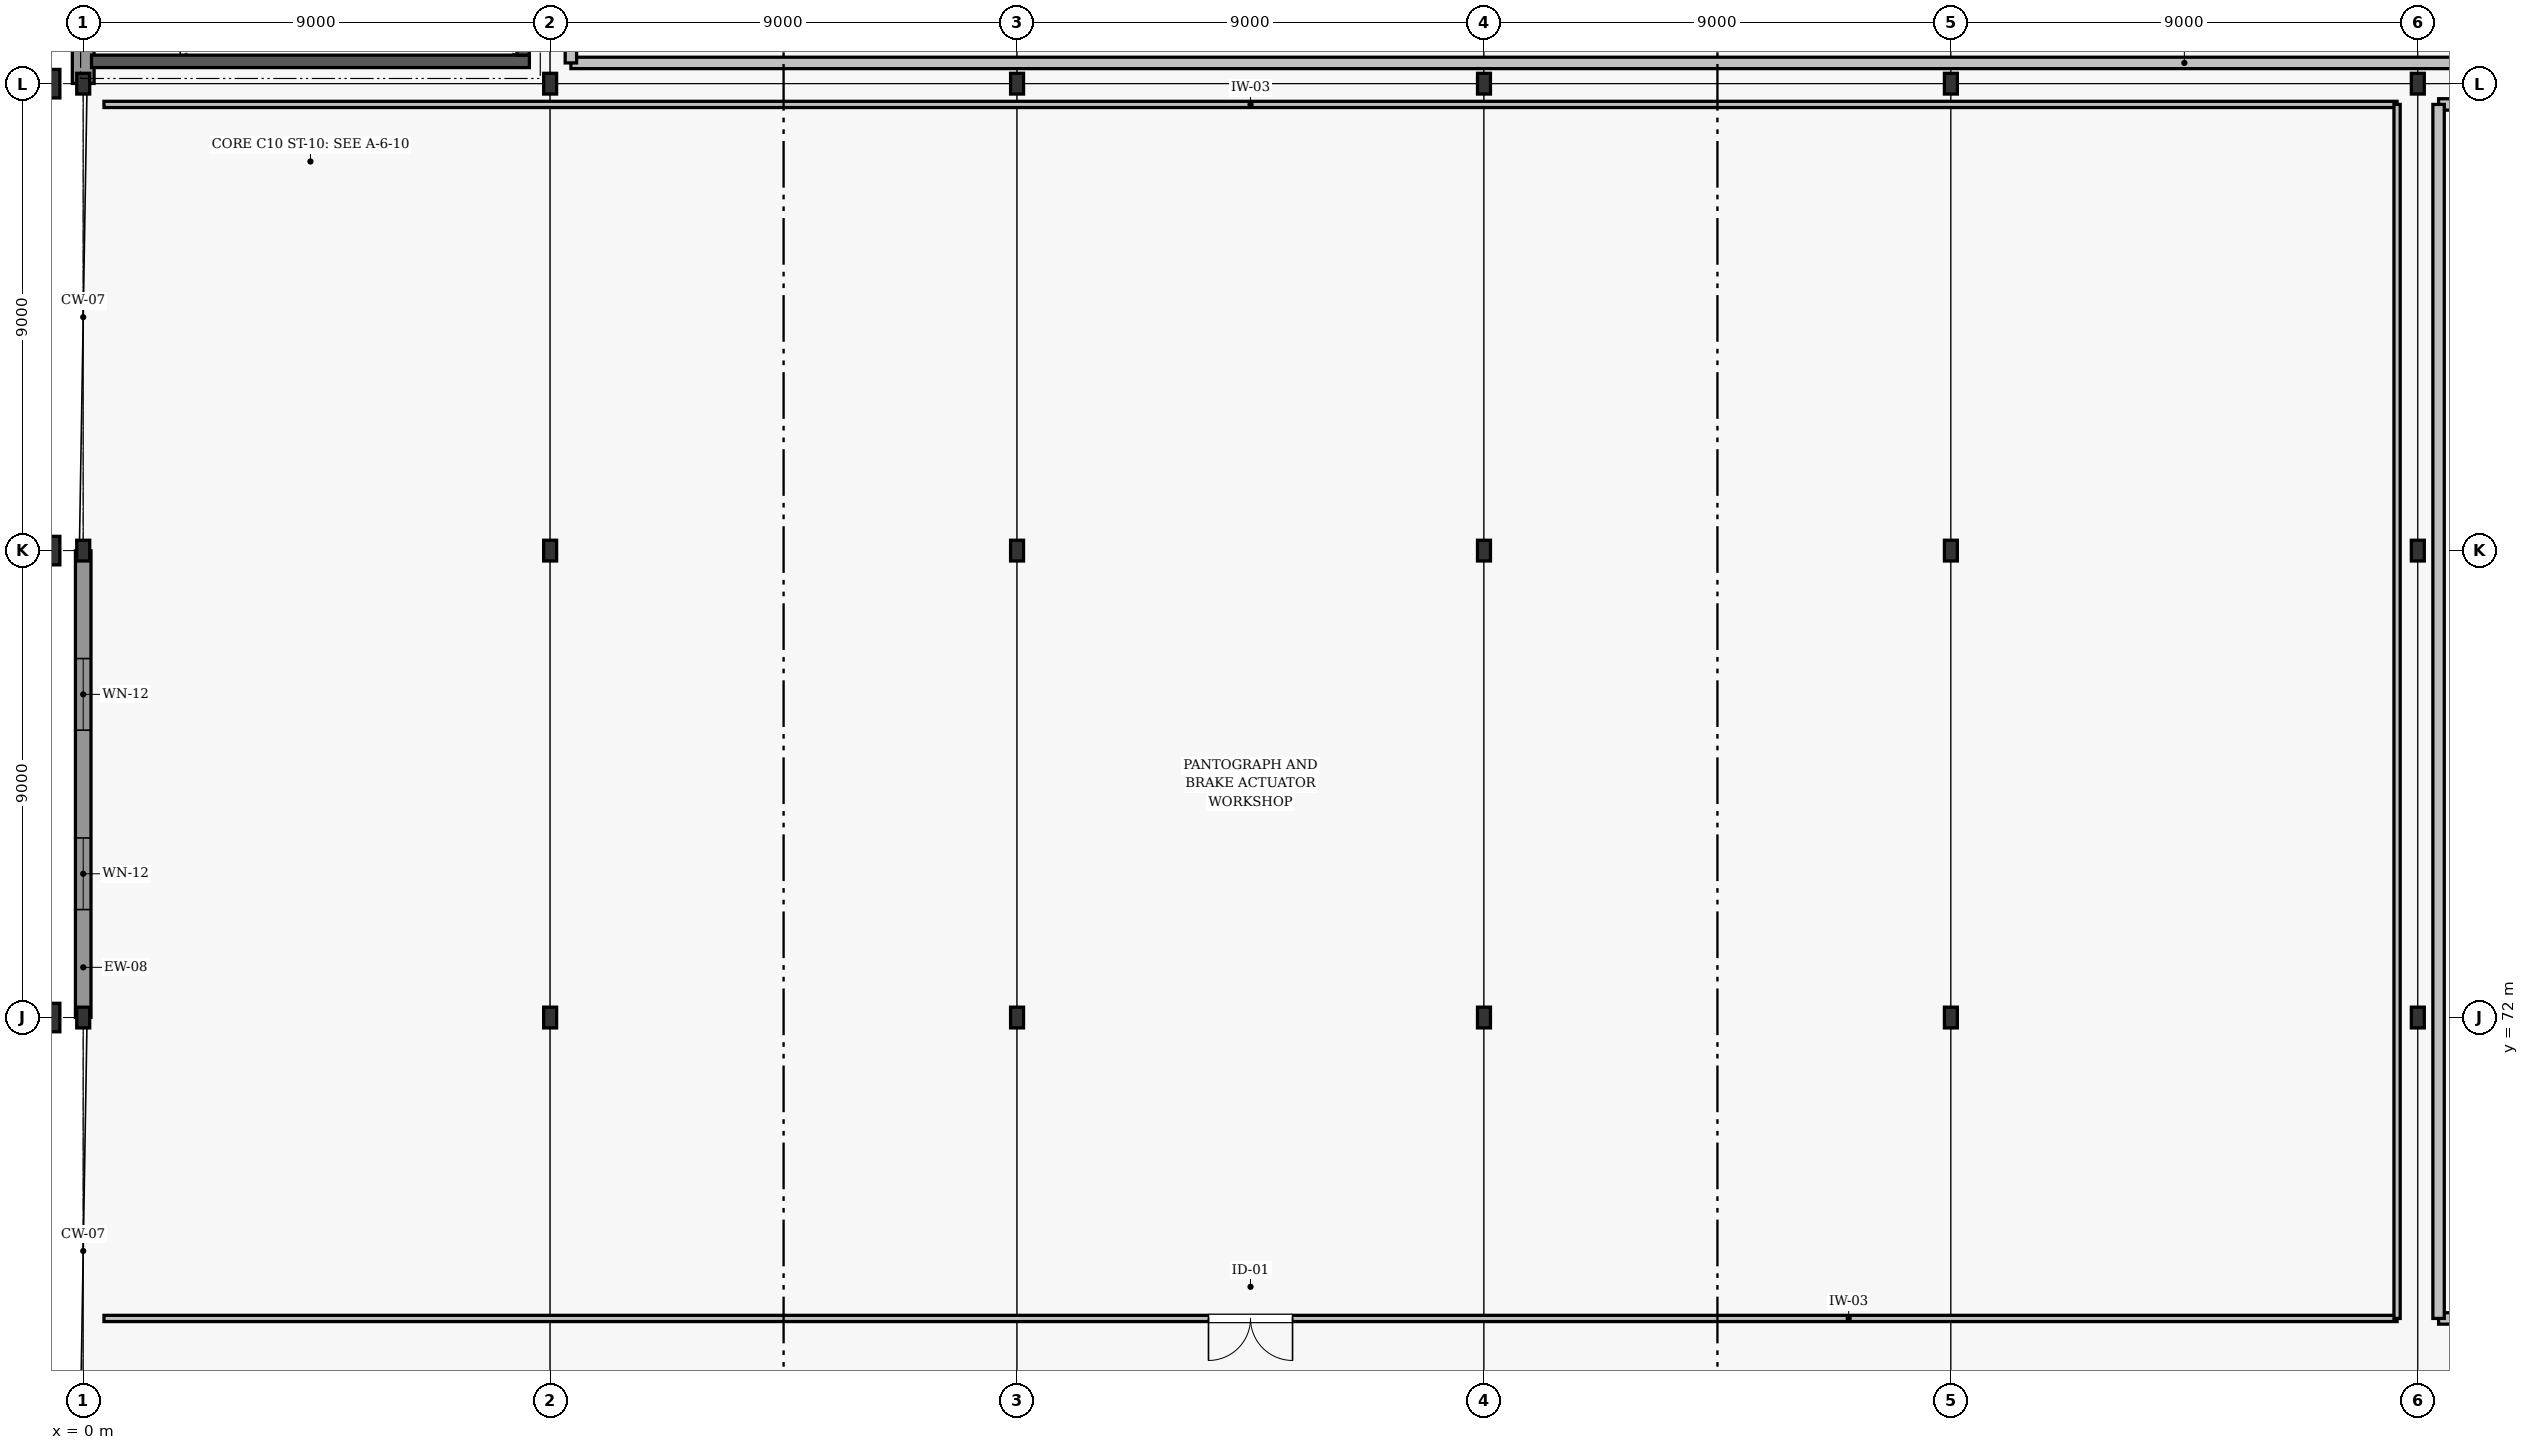
"""IFC4 building model, lengths in metres.
Left out: names, types, materials, properties, quantities, classifications, styles, units other than length and angle.
Written with IfcOpenShell. Run it as: python <this file> out.ifc"""

import sys

from ifc_helpers import new_model, si_unit, direction, frame, frame_2d, origin, origin_2d, place, context, subcontext, project, spatial, rectangle, i_section, extrude, element, fill, save


model = new_model("IFC4")
c1 = context("Model", 3, precision=1e-05, world=origin(), true_north=direction((0.0, 1.0)))
c2 = subcontext(c1, "Body", "Model", "MODEL_VIEW")
j1 = project(units=[si_unit("LENGTHUNIT", "METRE"), si_unit("PLANEANGLEUNIT", "RADIAN")], contexts=[c1])
p1 = place(None, origin())
s1 = spatial("IfcSite", under=j1, at=p1, CompositionType="ELEMENT")
p2 = place(p1, origin())
s2 = spatial("IfcBuilding", under=s1, at=p2, CompositionType="ELEMENT")
p3 = place(p2, frame((0.0, 0.0, 4.8)))
s3 = spatial("IfcBuildingStorey", under=s2, at=p3, CompositionType="ELEMENT", Elevation=4.8)
for number, where, z_axis, x_axis in (
    (1, (0.0, 72.0, 0.0), (0.0, 0.0, 1.0), (1.0, 0.0, 0.0)),
    (2, (0.0, 81.0, 0.0), (0.0, 0.0, 1.0), (1.0, 0.0, 0.0)),
    (3, (0.0, 90.0, 0.0), (0.0, 0.0, 1.0), (1.0, 0.0, 0.0)),
    (4, (9.0, 72.0, 0.0), (0.0, 0.0, 1.0), (1.0, 0.0, 0.0)),
    (5, (9.0, 81.0, 0.0), (0.0, 0.0, 1.0), (1.0, 0.0, 0.0)),
    (6, (9.0, 90.0, 0.0), (0.0, 0.0, 1.0), (1.0, 0.0, 0.0)),
    (7, (18.0, 72.0, 0.0), (0.0, 0.0, 1.0), (1.0, 0.0, 0.0)),
    (8, (18.0, 81.0, 0.0), (0.0, 0.0, 1.0), (1.0, 0.0, 0.0)),
    (9, (18.0, 90.0, 0.0), (0.0, 0.0, 1.0), (1.0, 0.0, 0.0)),
    (10, (27.0, 72.0, 0.0), (0.0, 0.0, 1.0), (1.0, 0.0, 0.0)),
    (11, (27.0, 81.0, 0.0), (0.0, 0.0, 1.0), (1.0, 0.0, 0.0)),
    (12, (27.0, 90.0, 0.0), (0.0, 0.0, 1.0), (1.0, 0.0, 0.0)),
    (13, (36.0, 72.0, 0.0), (0.0, 0.0, 1.0), (1.0, 0.0, 0.0)),
    (14, (36.0, 81.0, 0.0), (0.0, 0.0, 1.0), (1.0, 0.0, 0.0)),
    (15, (36.0, 90.0, 0.0), (0.0, 0.0, 1.0), (1.0, 0.0, 0.0)),
    (16, (45.0, 72.0, 0.0), (0.0, 0.0, 1.0), (1.0, 0.0, 0.0)),
    (17, (45.0, 81.0, 0.0), (0.0, 0.0, 1.0), (1.0, 0.0, 0.0)),
    (18, (45.0, 90.0, 0.0), (0.0, 0.0, 1.0), (1.0, 0.0, 0.0)),
):
    element("IfcColumn", number, at=place(p3, frame(where, z_axis=z_axis, x_axis=x_axis)), inside=s3, PredefinedType="COLUMN", context=c2, shape_type="SweptSolid", body=[
        extrude(i_section(OverallWidth=0.25, OverallDepth=0.4, WebThickness=0.01, FlangeThickness=0.013, FilletRadius=0.014, at=origin_2d()), origin(), (0.0, 0.0, 1.0), 3.6),
    ])
for number, where, z_axis, x_axis in (
    (19, (-0.85, 72.0, 0.0), (0.0, 0.0, 1.0), (0.0, 1.0, 0.0)),
    (20, (-0.85, 81.0, 0.0), (0.0, 0.0, 1.0), (0.0, 1.0, 0.0)),
    (21, (-0.85, 90.0, 0.0), (0.0, 0.0, 1.0), (0.0, 1.0, 0.0)),
):
    element("IfcColumn", number, at=place(p3, frame(where, z_axis=z_axis, x_axis=x_axis)), inside=s3, PredefinedType="PILASTER", context=c2, shape_type="SweptSolid", body=[
        extrude(rectangle(XDim=0.55, YDim=0.8, at=origin_2d()), origin(), (0.0, 0.0, 1.0), 3.6),
    ])
p4 = place(p3, frame((0.0, 72.004, 0.0), z_axis=(0.0, 0.0, 1.0), x_axis=(0.0, 1.0, 0.0)))
e22 = element("IfcWall", 22, at=p4, inside=s3, PredefinedType="SOLIDWALL", context=c2, shape_type="SweptSolid", body=[
    extrude(rectangle(XDim=8.992, YDim=0.3, at=frame_2d((4.496, 0.0))), origin(), (0.0, 0.0, 1.0), 2.842),
])
p5 = place(p4, frame((2.077, 0.0, 0.85)))
e23 = element("IfcOpeningElement", 23, at=p5, cuts=e22, PredefinedType="OPENING", context=c2, shape_type="SweptSolid", body=[
    extrude(rectangle(XDim=1.38, YDim=1.52, at=frame_2d((0.69, 0.76))), frame((0.0, 0.16, 0.0), z_axis=(0.0, -1.0, 0.0), x_axis=(1.0, 0.0, 0.0)), (0.0, 0.0, 1.0), 0.32),
])
p6 = place(p4, frame((5.535, 0.0, 0.85)))
e24 = element("IfcOpeningElement", 24, at=p6, cuts=e22, PredefinedType="OPENING", context=c2, shape_type="SweptSolid", body=[
    extrude(rectangle(XDim=1.38, YDim=1.52, at=frame_2d((0.69, 0.76))), frame((0.0, 0.16, 0.0), z_axis=(0.0, -1.0, 0.0), x_axis=(1.0, 0.0, 0.0)), (0.0, 0.0, 1.0), 0.32),
])
p7 = place(p3, frame((0.0, 90.004, 0.0), z_axis=(0.0, 0.0, 1.0), x_axis=(0.0, 1.0, 0.0)))
e25 = element("IfcWall", 25, at=p7, inside=s3, PredefinedType="SOLIDWALL", context=c2, shape_type="SweptSolid", body=[
    extrude(rectangle(XDim=8.992, YDim=0.42, at=frame_2d((4.496, 0.0))), origin(), (0.0, 0.0, 1.0), 2.842),
])
p8 = place(p3, frame((0.16, 90.43, 0.0), z_axis=(0.0, 0.0, 1.0), x_axis=(1.0, 0.0, 0.0)))
e26 = element("IfcWall", 26, at=p8, inside=s3, PredefinedType="SHEAR", context=c2, shape_type="SweptSolid", body=[
    extrude(rectangle(XDim=8.44, YDim=0.24, at=frame_2d((4.22, 0.0))), origin(), (0.0, 0.0, 1.0), 3.35),
])
p9 = place(p3, frame((8.48, 90.55, 0.0), z_axis=(0.0, 0.0, 1.0), x_axis=(0.0, 1.0, 0.0)))
e27 = element("IfcWall", 27, at=p9, inside=s3, PredefinedType="SHEAR", context=c2, shape_type="SweptSolid", body=[
    extrude(rectangle(XDim=3.19, YDim=0.24, at=frame_2d((1.595, 0.0))), origin(), (0.0, 0.0, 1.0), 3.35),
])
p10 = place(p3, frame((9.4, 90.4, 0.0), z_axis=(0.0, 0.0, 1.0), x_axis=(1.0, 0.0, 0.0)))
e28 = element("IfcWall", 28, at=p10, inside=s3, PredefinedType="SOLIDWALL", context=c2, shape_type="SweptSolid", body=[
    extrude(rectangle(XDim=62.2, YDim=0.22, at=frame_2d((31.1, 0.0))), origin(), (0.0, 0.0, 1.0), 3.045),
])
p11 = place(p3, frame((9.4, 90.4, 0.0), z_axis=(0.0, 0.0, 1.0), x_axis=(0.0, 1.0, 0.0)))
e29 = element("IfcWall", 29, at=p11, inside=s3, PredefinedType="SOLIDWALL", context=c2, shape_type="SweptSolid", body=[
    extrude(rectangle(XDim=3.6, YDim=0.22, at=frame_2d((1.8, 0.0))), origin(), (0.0, 0.0, 1.0), 3.35),
])
p12 = place(p3, frame((0.4, 66.2, 0.0), z_axis=(0.0, 0.0, 1.0), x_axis=(1.0, 0.0, 0.0)))
e30 = element("IfcWall", 30, at=p12, inside=s3, PredefinedType="PARTITIONING", context=c2, shape_type="SweptSolid", body=[
    extrude(rectangle(XDim=44.2, YDim=0.12, at=frame_2d((22.1, 0.0))), origin(), (0.0, 0.0, 1.0), 2.845),
])
p13 = place(p12, frame((21.29, 0.0, 0.0)))
e31 = element("IfcOpeningElement", 31, at=p13, cuts=e30, PredefinedType="OPENING", context=c2, shape_type="SweptSolid", body=[
    extrude(rectangle(XDim=1.62, YDim=2.14, at=frame_2d((0.81, 1.07))), frame((0.0, 0.07, 0.0), z_axis=(0.0, -1.0, 0.0), x_axis=(1.0, 0.0, 0.0)), (0.0, 0.0, 1.0), 0.14),
])
p14 = place(p3, frame((0.4, 89.6, 0.0), z_axis=(0.0, 0.0, 1.0), x_axis=(1.0, 0.0, 0.0)))
e32 = element("IfcWall", 32, at=p14, inside=s3, PredefinedType="PARTITIONING", context=c2, shape_type="SweptSolid", body=[
    extrude(rectangle(XDim=44.2, YDim=0.12, at=frame_2d((22.1, 0.0))), origin(), (0.0, 0.0, 1.0), 2.845),
])
p15 = place(p3, frame((44.6, 66.2, 0.0), z_axis=(0.0, 0.0, 1.0), x_axis=(0.0, 1.0, 0.0)))
e33 = element("IfcWall", 33, at=p15, inside=s3, PredefinedType="PARTITIONING", context=c2, shape_type="SweptSolid", body=[
    extrude(rectangle(XDim=23.4, YDim=0.12, at=frame_2d((11.7, 0.0))), origin(), (0.0, 0.0, 1.0), 3.35),
])
p16 = place(p3, frame((45.4, 66.2, 0.0), z_axis=(0.0, 0.0, 1.0), x_axis=(1.0, 0.0, 0.0)))
e34 = element("IfcWall", 34, at=p16, inside=s3, PredefinedType="SOLIDWALL", context=c2, shape_type="SweptSolid", body=[
    extrude(rectangle(XDim=44.2, YDim=0.22, at=frame_2d((22.1, 0.0))), origin(), (0.0, 0.0, 1.0), 2.845),
])
p17 = place(p16, frame((21.34, 0.0, 0.0)))
e35 = element("IfcOpeningElement", 35, at=p17, cuts=e34, PredefinedType="OPENING", context=c2, shape_type="SweptSolid", body=[
    extrude(rectangle(XDim=1.52, YDim=2.16, at=frame_2d((0.76, 1.08))), frame((0.0, 0.12, 0.0), z_axis=(0.0, -1.0, 0.0), x_axis=(1.0, 0.0, 0.0)), (0.0, 0.0, 1.0), 0.24),
])
p18 = place(p3, frame((45.4, 89.6, 0.0), z_axis=(0.0, 0.0, 1.0), x_axis=(1.0, 0.0, 0.0)))
e36 = element("IfcWall", 36, at=p18, inside=s3, PredefinedType="SOLIDWALL", context=c2, shape_type="SweptSolid", body=[
    extrude(rectangle(XDim=44.2, YDim=0.22, at=frame_2d((22.1, 0.0))), origin(), (0.0, 0.0, 1.0), 2.845),
])
p19 = place(p3, frame((45.4, 66.2, 0.0), z_axis=(0.0, 0.0, 1.0), x_axis=(0.0, 1.0, 0.0)))
e37 = element("IfcWall", 37, at=p19, inside=s3, PredefinedType="SOLIDWALL", context=c2, shape_type="SweptSolid", body=[
    extrude(rectangle(XDim=23.4, YDim=0.22, at=frame_2d((11.7, 0.0))), origin(), (0.0, 0.0, 1.0), 3.35),
])
p20 = place(p5, origin())
e38 = element("IfcWindow", 38, at=p20, inside=s3, PartitioningType="SINGLE_PANEL", PredefinedType="WINDOW", context=c2, shape_type="SweptSolid", body=[
    extrude(rectangle(XDim=1.38, YDim=1.52, at=frame_2d((0.69, 0.76))), frame((0.0, 0.03, 0.0), z_axis=(0.0, -1.0, 0.0), x_axis=(1.0, 0.0, 0.0)), (0.0, 0.0, 1.0), 0.06),
])
fill(e23, e38)
p21 = place(p6, origin())
e39 = element("IfcWindow", 39, at=p21, inside=s3, PartitioningType="SINGLE_PANEL", PredefinedType="WINDOW", context=c2, shape_type="SweptSolid", body=[
    extrude(rectangle(XDim=1.38, YDim=1.52, at=frame_2d((0.69, 0.76))), frame((0.0, 0.03, 0.0), z_axis=(0.0, -1.0, 0.0), x_axis=(1.0, 0.0, 0.0)), (0.0, 0.0, 1.0), 0.06),
])
fill(e24, e39)
p22 = place(p13, frame((1.62, 0.0, 0.0), z_axis=(0.0, 0.0, 1.0), x_axis=(-1.0, 0.0, 0.0)))
e40 = element("IfcDoor", 40, at=p22, inside=s3, OperationType="DOUBLE_SWING_LEFT", PredefinedType="DOOR", context=c2, shape_type="SweptSolid", body=[
    extrude(rectangle(XDim=1.62, YDim=2.14, at=frame_2d((0.81, 1.07))), frame((0.0, 0.025, 0.0), z_axis=(0.0, -1.0, 0.0), x_axis=(1.0, 0.0, 0.0)), (0.0, 0.0, 1.0), 0.05),
])
fill(e31, e40)
save(model, sys.argv[1])
